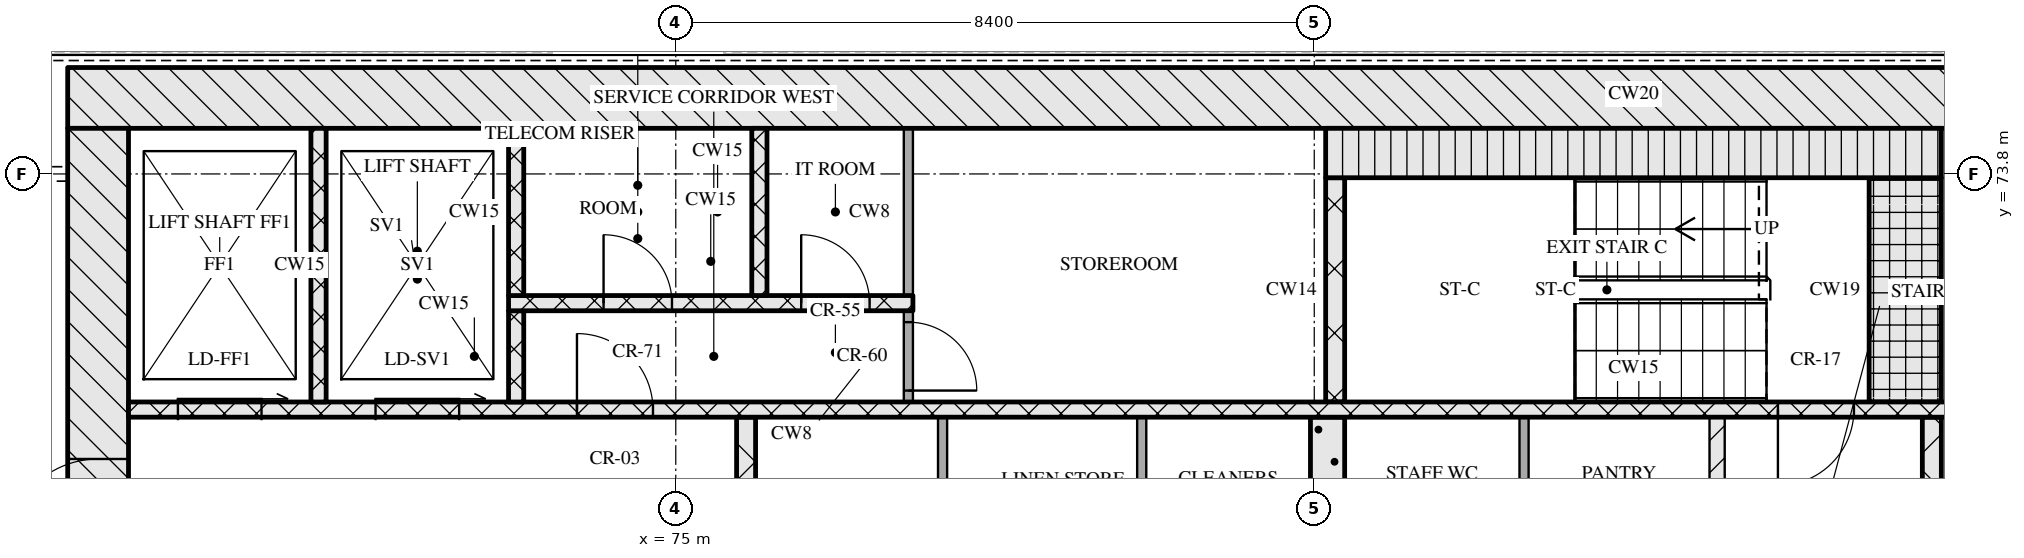
"""IFC4 building model, lengths in metres.
Left out: names, types, materials, properties, quantities, classifications, styles, units other than length and angle.
Written with IfcOpenShell. Run it as: python <this file> out.ifc"""

import sys

from ifc_helpers import new_model, si_unit, direction, frame, frame_2d, origin, place, context, subcontext, project, spatial, rectangle, extrude, element, fill, save


model = new_model("IFC4")
c1 = context("Model", 3, precision=1e-05, world=origin(), true_north=direction((0.0, 1.0)))
c2 = subcontext(c1, "Body", "Model", "MODEL_VIEW")
j1 = project(units=[si_unit("LENGTHUNIT", "METRE"), si_unit("PLANEANGLEUNIT", "RADIAN")], contexts=[c1])
p1 = place(None, origin())
s1 = spatial("IfcSite", under=j1, at=p1, CompositionType="ELEMENT")
p2 = place(p1, origin())
s2 = spatial("IfcBuilding", under=s1, at=p2, CompositionType="ELEMENT")
p3 = place(p2, frame((0.0, 0.0, 187.05)))
s3 = spatial("IfcBuildingStorey", under=s2, at=p3, CompositionType="ELEMENT", Elevation=187.05)
p4 = place(p3, frame((67.0, 74.8, 0.0), z_axis=(0.0, 0.0, 1.0), x_axis=(1.0, 0.0, 0.0)))
e1 = element("IfcWall", 1, at=p4, inside=s3, PredefinedType="SOLIDWALL", context=c2, shape_type="SweptSolid", body=[
    extrude(rectangle(XDim=41.2, YDim=0.8, at=frame_2d((20.6, 0.0))), origin(), (0.0, 0.0, 1.0), 3.32),
])
p5 = place(p3, frame((67.4, 62.4, 0.0), z_axis=(0.0, 0.0, 1.0), x_axis=(0.0, 1.0, 0.0)))
e2 = element("IfcWall", 2, at=p5, inside=s3, PredefinedType="SOLIDWALL", context=c2, shape_type="SweptSolid", body=[
    extrude(rectangle(XDim=12.0, YDim=0.8, at=frame_2d((6.0, 0.0))), origin(), (0.0, 0.0, 1.0), 3.32),
])
p6 = place(p5, frame((6.45, 0.0, 0.0)))
e3 = element("IfcOpeningElement", 3, at=p6, cuts=e2, PredefinedType="OPENING", context=c2, shape_type="SweptSolid", body=[
    extrude(rectangle(XDim=1.2, YDim=2.1, at=frame_2d((0.6, 1.05))), frame((0.0, 0.41, 0.0), z_axis=(0.0, -1.0, 0.0), x_axis=(1.0, 0.0, 0.0)), (0.0, 0.0, 1.0), 0.82),
])
for number, where, z_axis, x_axis in (
    (4, (78.51, 68.0, 0.0), (0.0, 0.0, 1.0), (0.0, 1.0, 0.0)),
    (5, (81.13, 68.0, 0.0), (0.0, 0.0, 1.0), (0.0, 1.0, 0.0)),
):
    element("IfcWall", number, at=place(p3, frame(where, z_axis=z_axis, x_axis=x_axis)), inside=s3, PredefinedType="PARTITIONING", context=c2, shape_type="SweptSolid", body=[
        extrude(rectangle(XDim=2.6, YDim=0.12, at=frame_2d((1.3, 0.0))), origin(), (0.0, 0.0, 1.0), 3.32),
    ])
p7 = place(p3, frame((83.575, 68.0, 0.0), z_axis=(0.0, 0.0, 1.0), x_axis=(0.0, 1.0, 0.0)))
e6 = element("IfcWall", 6, at=p7, inside=s3, PredefinedType="SOLIDWALL", context=c2, shape_type="SweptSolid", body=[
    extrude(rectangle(XDim=2.6, YDim=0.45, at=frame_2d((1.3, 0.0))), origin(), (0.0, 0.0, 1.0), 3.32),
])
p8 = place(p3, frame((86.16, 68.0, 0.0), z_axis=(0.0, 0.0, 1.0), x_axis=(0.0, 1.0, 0.0)))
e7 = element("IfcWall", 7, at=p8, inside=s3, PredefinedType="PARTITIONING", context=c2, shape_type="SweptSolid", body=[
    extrude(rectangle(XDim=2.6, YDim=0.12, at=frame_2d((1.3, 0.0))), origin(), (0.0, 0.0, 1.0), 3.32),
])
p9 = place(p3, frame((88.7, 68.0, 0.0), z_axis=(0.0, 0.0, 1.0), x_axis=(0.0, 1.0, 0.0)))
e8 = element("IfcWall", 8, at=p9, inside=s3, PredefinedType="PARTITIONING", context=c2, shape_type="SweptSolid", body=[
    extrude(rectangle(XDim=2.6, YDim=0.2, at=frame_2d((1.3, 0.0))), origin(), (0.0, 0.0, 1.0), 3.32),
])
p10 = place(p3, frame((91.525, 68.0, 0.0), z_axis=(0.0, 0.0, 1.0), x_axis=(0.0, 1.0, 0.0)))
e9 = element("IfcWall", 9, at=p10, inside=s3, PredefinedType="SOLIDWALL", context=c2, shape_type="SweptSolid", body=[
    extrude(rectangle(XDim=2.6, YDim=0.25, at=frame_2d((1.3, 0.0))), origin(), (0.0, 0.0, 1.0), 3.32),
])
p11 = place(p3, frame((75.925, 68.3, 0.0), z_axis=(0.0, 0.0, 1.0), x_axis=(0.0, 1.0, 0.0)))
e10 = element("IfcWall", 10, at=p11, inside=s3, PredefinedType="SOLIDWALL", context=c2, shape_type="SweptSolid", body=[
    extrude(rectangle(XDim=2.3, YDim=0.25, at=frame_2d((1.15, 0.0))), origin(), (0.0, 0.0, 1.0), 3.32),
])
p12 = place(p3, frame((67.8, 70.7, 0.0), z_axis=(0.0, 0.0, 1.0), x_axis=(1.0, 0.0, 0.0)))
e11 = element("IfcWall", 11, at=p12, inside=s3, PredefinedType="SOLIDWALL", context=c2, shape_type="SweptSolid", body=[
    extrude(rectangle(XDim=39.6, YDim=0.2, at=frame_2d((19.8, 0.0))), origin(), (0.0, 0.0, 1.0), 3.32),
])
p13 = place(p12, frame((0.65, 0.0, 0.0)))
e12 = element("IfcOpeningElement", 12, at=p13, cuts=e11, PredefinedType="OPENING", context=c2, shape_type="SweptSolid", body=[
    extrude(rectangle(XDim=1.1, YDim=2.1, at=frame_2d((0.55, 1.05))), frame((0.0, 0.11, 0.0), z_axis=(0.0, -1.0, 0.0), x_axis=(1.0, 0.0, 0.0)), (0.0, 0.0, 1.0), 0.22),
])
p14 = place(p12, frame((3.25, 0.0, 0.0)))
e13 = element("IfcOpeningElement", 13, at=p14, cuts=e11, PredefinedType="OPENING", context=c2, shape_type="SweptSolid", body=[
    extrude(rectangle(XDim=1.1, YDim=2.1, at=frame_2d((0.55, 1.05))), frame((0.0, 0.11, 0.0), z_axis=(0.0, -1.0, 0.0), x_axis=(1.0, 0.0, 0.0)), (0.0, 0.0, 1.0), 0.22),
])
p15 = place(p12, frame((5.9, 0.0, 0.0)))
e14 = element("IfcOpeningElement", 14, at=p15, cuts=e11, PredefinedType="OPENING", context=c2, shape_type="SweptSolid", body=[
    extrude(rectangle(XDim=1.0, YDim=2.1, at=frame_2d((0.5, 1.05))), frame((0.0, 0.11, 0.0), z_axis=(0.0, -1.0, 0.0), x_axis=(1.0, 0.0, 0.0)), (0.0, 0.0, 1.0), 0.22),
])
p16 = place(p12, frame((21.7, 0.0, 0.0)))
e15 = element("IfcOpeningElement", 15, at=p16, cuts=e11, PredefinedType="OPENING", context=c2, shape_type="SweptSolid", body=[
    extrude(rectangle(XDim=1.0, YDim=2.1, at=frame_2d((0.5, 1.05))), frame((0.0, 0.11, 0.0), z_axis=(0.0, -1.0, 0.0), x_axis=(1.0, 0.0, 0.0)), (0.0, 0.0, 1.0), 0.22),
])
p17 = place(p12, frame((32.7, 0.0, 0.0)))
e16 = element("IfcOpeningElement", 16, at=p17, cuts=e11, PredefinedType="OPENING", context=c2, shape_type="SweptSolid", body=[
    extrude(rectangle(XDim=1.0, YDim=2.1, at=frame_2d((0.5, 1.05))), frame((0.0, 0.11, 0.0), z_axis=(0.0, -1.0, 0.0), x_axis=(1.0, 0.0, 0.0)), (0.0, 0.0, 1.0), 0.22),
])
p18 = place(p12, frame((35.25, 0.0, 0.0)))
e17 = element("IfcOpeningElement", 17, at=p18, cuts=e11, PredefinedType="OPENING", context=c2, shape_type="SweptSolid", body=[
    extrude(rectangle(XDim=1.1, YDim=2.1, at=frame_2d((0.55, 1.05))), frame((0.0, 0.11, 0.0), z_axis=(0.0, -1.0, 0.0), x_axis=(1.0, 0.0, 0.0)), (0.0, 0.0, 1.0), 0.22),
])
p19 = place(p12, frame((37.85, 0.0, 0.0)))
e18 = element("IfcOpeningElement", 18, at=p19, cuts=e11, PredefinedType="OPENING", context=c2, shape_type="SweptSolid", body=[
    extrude(rectangle(XDim=1.1, YDim=2.1, at=frame_2d((0.55, 1.05))), frame((0.0, 0.11, 0.0), z_axis=(0.0, -1.0, 0.0), x_axis=(1.0, 0.0, 0.0)), (0.0, 0.0, 1.0), 0.22),
])
p20 = place(p3, frame((70.3, 70.8, 0.0), z_axis=(0.0, 0.0, 1.0), x_axis=(0.0, 1.0, 0.0)))
e19 = element("IfcWall", 19, at=p20, inside=s3, PredefinedType="SOLIDWALL", context=c2, shape_type="SweptSolid", body=[
    extrude(rectangle(XDim=3.6, YDim=0.2, at=frame_2d((1.8, 0.0))), origin(), (0.0, 0.0, 1.0), 3.32),
])
p21 = place(p3, frame((72.9, 70.8, 0.0), z_axis=(0.0, 0.0, 1.0), x_axis=(0.0, 1.0, 0.0)))
e20 = element("IfcWall", 20, at=p21, inside=s3, PredefinedType="SOLIDWALL", context=c2, shape_type="SweptSolid", body=[
    extrude(rectangle(XDim=1.2, YDim=0.2, at=frame_2d((0.6, 0.0))), origin(), (0.0, 0.0, 1.0), 3.32),
])
p22 = place(p3, frame((78.06, 70.8, 0.0), z_axis=(0.0, 0.0, 1.0), x_axis=(0.0, 1.0, 0.0)))
e21 = element("IfcWall", 21, at=p22, inside=s3, PredefinedType="PARTITIONING", context=c2, shape_type="SweptSolid", body=[
    extrude(rectangle(XDim=1.2, YDim=0.12, at=frame_2d((0.6, 0.0))), origin(), (0.0, 0.0, 1.0), 3.32),
])
p23 = place(p22, frame((0.15, 0.0, 0.0)))
e22 = element("IfcOpeningElement", 22, at=p23, cuts=e21, PredefinedType="OPENING", context=c2, shape_type="SweptSolid", body=[
    extrude(rectangle(XDim=0.9, YDim=2.1, at=frame_2d((0.45, 1.05))), frame((0.0, 0.07, 0.0), z_axis=(0.0, -1.0, 0.0), x_axis=(1.0, 0.0, 0.0)), (0.0, 0.0, 1.0), 0.14),
])
p24 = place(p3, frame((83.675, 70.8, 0.0), z_axis=(0.0, 0.0, 1.0), x_axis=(0.0, 1.0, 0.0)))
e23 = element("IfcWall", 23, at=p24, inside=s3, PredefinedType="SOLIDWALL", context=c2, shape_type="SweptSolid", body=[
    extrude(rectangle(XDim=2.95, YDim=0.25, at=frame_2d((1.475, 0.0))), origin(), (0.0, 0.0, 1.0), 3.32),
])
p25 = place(p3, frame((91.175, 70.8, 0.0), z_axis=(0.0, 0.0, 1.0), x_axis=(0.0, 1.0, 0.0)))
e24 = element("IfcWall", 24, at=p25, inside=s3, PredefinedType="SOLIDWALL", context=c2, shape_type="SweptSolid", body=[
    extrude(rectangle(XDim=2.95, YDim=0.95, at=frame_2d((1.475, 0.0))), origin(), (0.0, 0.0, 1.0), 3.32),
])
p26 = place(p3, frame((72.8, 72.1, 0.0), z_axis=(0.0, 0.0, 1.0), x_axis=(1.0, 0.0, 0.0)))
e25 = element("IfcWall", 25, at=p26, inside=s3, PredefinedType="SOLIDWALL", context=c2, shape_type="SweptSolid", body=[
    extrude(rectangle(XDim=5.32, YDim=0.2, at=frame_2d((2.66, 0.0))), origin(), (0.0, 0.0, 1.0), 3.32),
])
p27 = place(p26, frame((1.25, 0.0, 0.0)))
e26 = element("IfcOpeningElement", 26, at=p27, cuts=e25, PredefinedType="OPENING", context=c2, shape_type="SweptSolid", body=[
    extrude(rectangle(XDim=0.9, YDim=2.1, at=frame_2d((0.45, 1.05))), frame((0.0, 0.11, 0.0), z_axis=(0.0, -1.0, 0.0), x_axis=(1.0, 0.0, 0.0)), (0.0, 0.0, 1.0), 0.22),
])
p28 = place(p26, frame((3.85, 0.0, 0.0)))
e27 = element("IfcOpeningElement", 27, at=p28, cuts=e25, PredefinedType="OPENING", context=c2, shape_type="SweptSolid", body=[
    extrude(rectangle(XDim=0.9, YDim=2.1, at=frame_2d((0.45, 1.05))), frame((0.0, 0.11, 0.0), z_axis=(0.0, -1.0, 0.0), x_axis=(1.0, 0.0, 0.0)), (0.0, 0.0, 1.0), 0.22),
])
for number, where, z_axis, x_axis in (
    (28, (72.9, 72.2, 0.0), (0.0, 0.0, 1.0), (0.0, 1.0, 0.0)),
    (29, (76.1, 72.2, 0.0), (0.0, 0.0, 1.0), (0.0, 1.0, 0.0)),
):
    element("IfcWall", number, at=place(p3, frame(where, z_axis=z_axis, x_axis=x_axis)), inside=s3, PredefinedType="SOLIDWALL", context=c2, shape_type="SweptSolid", body=[
        extrude(rectangle(XDim=2.2, YDim=0.2, at=frame_2d((1.1, 0.0))), origin(), (0.0, 0.0, 1.0), 3.32),
    ])
p29 = place(p3, frame((78.06, 72.2, 0.0), z_axis=(0.0, 0.0, 1.0), x_axis=(0.0, 1.0, 0.0)))
e30 = element("IfcWall", 30, at=p29, inside=s3, PredefinedType="PARTITIONING", context=c2, shape_type="SweptSolid", body=[
    extrude(rectangle(XDim=2.2, YDim=0.12, at=frame_2d((1.1, 0.0))), origin(), (0.0, 0.0, 1.0), 3.32),
])
p30 = place(p3, frame((83.55, 74.075, 0.0), z_axis=(0.0, 0.0, 1.0), x_axis=(1.0, 0.0, 0.0)))
e31 = element("IfcWall", 31, at=p30, inside=s3, PredefinedType="SOLIDWALL", context=c2, shape_type="SweptSolid", body=[
    extrude(rectangle(XDim=8.1, YDim=0.65, at=frame_2d((4.05, 0.0))), origin(), (0.0, 0.0, 1.0), 3.32),
])
p31 = place(p6, origin())
e32 = element("IfcDoor", 32, at=p31, inside=s3, OperationType="SINGLE_SWING_LEFT", PredefinedType="DOOR", context=c2, shape_type="SweptSolid", body=[
    extrude(rectangle(XDim=1.2, YDim=2.1, at=frame_2d((0.6, 1.05))), frame((0.0, 0.025, 0.0), z_axis=(0.0, -1.0, 0.0), x_axis=(1.0, 0.0, 0.0)), (0.0, 0.0, 1.0), 0.05),
])
fill(e3, e32)
p32 = place(p13, origin())
e33 = element("IfcDoor", 33, at=p32, inside=s3, OperationType="SLIDING_TO_RIGHT", PredefinedType="DOOR", context=c2, shape_type="SweptSolid", body=[
    extrude(rectangle(XDim=1.1, YDim=2.1, at=frame_2d((0.55, 1.05))), frame((0.0, 0.025, 0.0), z_axis=(0.0, -1.0, 0.0), x_axis=(1.0, 0.0, 0.0)), (0.0, 0.0, 1.0), 0.05),
])
fill(e12, e33)
p33 = place(p14, origin())
e34 = element("IfcDoor", 34, at=p33, inside=s3, OperationType="SLIDING_TO_RIGHT", PredefinedType="DOOR", context=c2, shape_type="SweptSolid", body=[
    extrude(rectangle(XDim=1.1, YDim=2.1, at=frame_2d((0.55, 1.05))), frame((0.0, 0.025, 0.0), z_axis=(0.0, -1.0, 0.0), x_axis=(1.0, 0.0, 0.0)), (0.0, 0.0, 1.0), 0.05),
])
fill(e13, e34)
p34 = place(p15, origin())
e35 = element("IfcDoor", 35, at=p34, inside=s3, OperationType="SINGLE_SWING_LEFT", PredefinedType="DOOR", context=c2, shape_type="SweptSolid", body=[
    extrude(rectangle(XDim=1.0, YDim=2.1, at=frame_2d((0.5, 1.05))), frame((0.0, 0.025, 0.0), z_axis=(0.0, -1.0, 0.0), x_axis=(1.0, 0.0, 0.0)), (0.0, 0.0, 1.0), 0.05),
])
fill(e14, e35)
p35 = place(p16, origin())
e36 = element("IfcDoor", 36, at=p35, inside=s3, OperationType="SINGLE_SWING_RIGHT", PredefinedType="DOOR", context=c2, shape_type="SweptSolid", body=[
    extrude(rectangle(XDim=1.0, YDim=2.1, at=frame_2d((0.5, 1.05))), frame((0.0, 0.025, 0.0), z_axis=(0.0, -1.0, 0.0), x_axis=(1.0, 0.0, 0.0)), (0.0, 0.0, 1.0), 0.05),
])
fill(e15, e36)
p36 = place(p23, origin())
e37 = element("IfcDoor", 37, at=p36, inside=s3, OperationType="SINGLE_SWING_RIGHT", PredefinedType="DOOR", context=c2, shape_type="SweptSolid", body=[
    extrude(rectangle(XDim=0.9, YDim=2.1, at=frame_2d((0.45, 1.05))), frame((0.0, 0.025, 0.0), z_axis=(0.0, -1.0, 0.0), x_axis=(1.0, 0.0, 0.0)), (0.0, 0.0, 1.0), 0.05),
])
fill(e22, e37)
p37 = place(p27, origin())
e38 = element("IfcDoor", 38, at=p37, inside=s3, OperationType="SINGLE_SWING_LEFT", PredefinedType="DOOR", context=c2, shape_type="SweptSolid", body=[
    extrude(rectangle(XDim=0.9, YDim=2.1, at=frame_2d((0.45, 1.05))), frame((0.0, 0.025, 0.0), z_axis=(0.0, -1.0, 0.0), x_axis=(1.0, 0.0, 0.0)), (0.0, 0.0, 1.0), 0.05),
])
fill(e26, e38)
p38 = place(p28, origin())
e39 = element("IfcDoor", 39, at=p38, inside=s3, OperationType="SINGLE_SWING_LEFT", PredefinedType="DOOR", context=c2, shape_type="SweptSolid", body=[
    extrude(rectangle(XDim=0.9, YDim=2.1, at=frame_2d((0.45, 1.05))), frame((0.0, 0.025, 0.0), z_axis=(0.0, -1.0, 0.0), x_axis=(1.0, 0.0, 0.0)), (0.0, 0.0, 1.0), 0.05),
])
fill(e27, e39)
save(model, sys.argv[1])
